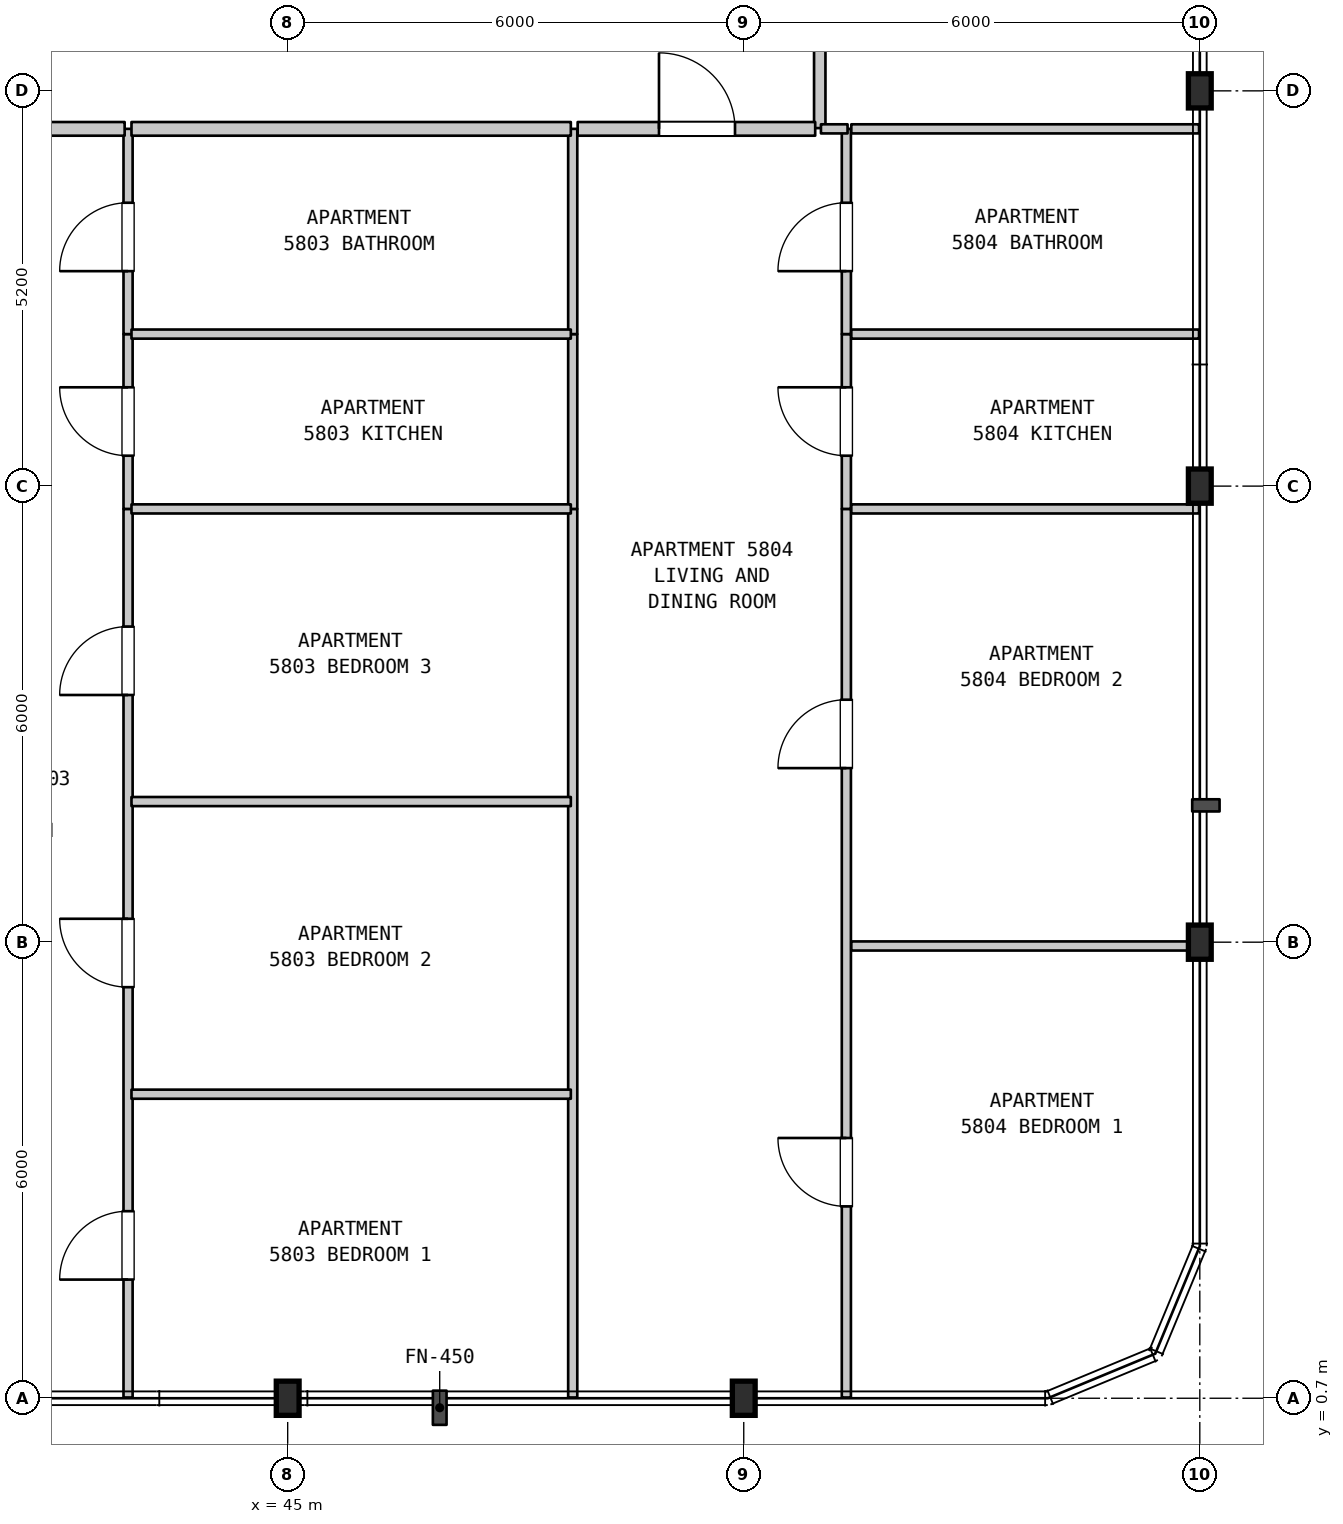
"""IFC4 building model, lengths in metres.
Left out: names, types, materials, properties, quantities, classifications, styles, units other than length and angle.
Written with IfcOpenShell. Run it as: python <this file> out.ifc"""

import sys

from ifc_helpers import new_model, si_unit, direction, frame, frame_2d, origin, origin_2d, place, context, subcontext, project, spatial, rectangle, i_section, extrude, element, fill, save


model = new_model("IFC4")
c1 = context("Model", 3, precision=1e-05, world=origin(), true_north=direction((0.0, 1.0)))
c2 = subcontext(c1, "Body", "Model", "MODEL_VIEW")
j1 = project(units=[si_unit("LENGTHUNIT", "METRE"), si_unit("PLANEANGLEUNIT", "RADIAN")], contexts=[c1])
p1 = place(None, origin())
s1 = spatial("IfcSite", under=j1, at=p1, CompositionType="ELEMENT")
p2 = place(p1, origin())
s2 = spatial("IfcBuilding", under=s1, at=p2, CompositionType="ELEMENT")
p3 = place(p2, frame((0.0, 0.0, 233.9)))
s3 = spatial("IfcBuildingStorey", under=s2, at=p3, CompositionType="ELEMENT", Elevation=233.9)
for number, where, z_axis, x_axis in (
    (1, (45.0, 0.7, 0.0), (0.0, 0.0, 1.0), (1.0, 0.0, 0.0)),
    (2, (51.0, 0.7, 0.0), (0.0, 0.0, 1.0), (1.0, 0.0, 0.0)),
    (3, (57.0, 6.7, 0.0), (0.0, 0.0, 1.0), (1.0, 0.0, 0.0)),
    (4, (57.0, 12.7, 0.0), (0.0, 0.0, 1.0), (1.0, 0.0, 0.0)),
    (5, (57.0, 17.9, 0.0), (0.0, 0.0, 1.0), (1.0, 0.0, 0.0)),
):
    element("IfcColumn", number, at=place(p3, frame(where, z_axis=z_axis, x_axis=x_axis)), inside=s3, PredefinedType="COLUMN", context=c2, shape_type="SweptSolid", body=[
        extrude(i_section(OverallWidth=0.3, OverallDepth=0.45, WebThickness=0.014, FlangeThickness=0.026, FilletRadius=0.027, at=origin_2d()), origin(), (0.0, 0.0, 1.0), 3.7),
    ])
p4 = place(p3, frame((42.9, 0.71, 0.0), z_axis=(0.0, 0.0, 1.0), x_axis=(0.0, 1.0, 0.0)))
e6 = element("IfcWall", 6, at=p4, inside=s3, PredefinedType="PARTITIONING", context=c2, shape_type="SweptSolid", body=[
    extrude(rectangle(XDim=11.69, YDim=0.12, at=frame_2d((5.845, 0.0))), origin(), (0.0, 0.0, 1.0), 3.28),
])
p5 = place(p4, frame((1.551, 0.0, 0.0)))
e7 = element("IfcOpeningElement", 7, at=p5, cuts=e6, PredefinedType="OPENING", context=c2, shape_type="SweptSolid", body=[
    extrude(rectangle(XDim=0.9, YDim=2.15, at=frame_2d((0.45, 1.075))), frame((0.0, 0.07, 0.0), z_axis=(0.0, -1.0, 0.0), x_axis=(1.0, 0.0, 0.0)), (0.0, 0.0, 1.0), 0.14),
])
p6 = place(p4, frame((5.398, 0.0, 0.0)))
e8 = element("IfcOpeningElement", 8, at=p6, cuts=e6, PredefinedType="OPENING", context=c2, shape_type="SweptSolid", body=[
    extrude(rectangle(XDim=0.9, YDim=2.15, at=frame_2d((0.45, 1.075))), frame((0.0, 0.07, 0.0), z_axis=(0.0, -1.0, 0.0), x_axis=(1.0, 0.0, 0.0)), (0.0, 0.0, 1.0), 0.14),
])
p7 = place(p4, frame((9.242, 0.0, 0.0)))
e9 = element("IfcOpeningElement", 9, at=p7, cuts=e6, PredefinedType="OPENING", context=c2, shape_type="SweptSolid", body=[
    extrude(rectangle(XDim=0.9, YDim=2.15, at=frame_2d((0.45, 1.075))), frame((0.0, 0.07, 0.0), z_axis=(0.0, -1.0, 0.0), x_axis=(1.0, 0.0, 0.0)), (0.0, 0.0, 1.0), 0.14),
])
p8 = place(p3, frame((42.9, 12.4, 0.0), z_axis=(0.0, 0.0, 1.0), x_axis=(0.0, 1.0, 0.0)))
e10 = element("IfcWall", 10, at=p8, inside=s3, PredefinedType="PARTITIONING", context=c2, shape_type="SweptSolid", body=[
    extrude(rectangle(XDim=2.3, YDim=0.12, at=frame_2d((1.15, 0.0))), origin(), (0.0, 0.0, 1.0), 3.28),
])
p9 = place(p8, frame((0.7, 0.0, 0.0)))
e11 = element("IfcOpeningElement", 11, at=p9, cuts=e10, PredefinedType="OPENING", context=c2, shape_type="SweptSolid", body=[
    extrude(rectangle(XDim=0.9, YDim=2.15, at=frame_2d((0.45, 1.075))), frame((0.0, 0.07, 0.0), z_axis=(0.0, -1.0, 0.0), x_axis=(1.0, 0.0, 0.0)), (0.0, 0.0, 1.0), 0.14),
])
p10 = place(p3, frame((42.9, 14.7, 0.0), z_axis=(0.0, 0.0, 1.0), x_axis=(0.0, 1.0, 0.0)))
e12 = element("IfcWall", 12, at=p10, inside=s3, PredefinedType="PARTITIONING", context=c2, shape_type="SweptSolid", body=[
    extrude(rectangle(XDim=2.7, YDim=0.12, at=frame_2d((1.35, 0.0))), origin(), (0.0, 0.0, 1.0), 3.28),
])
p11 = place(p10, frame((0.828, 0.0, 0.0)))
e13 = element("IfcOpeningElement", 13, at=p11, cuts=e12, PredefinedType="OPENING", context=c2, shape_type="SweptSolid", body=[
    extrude(rectangle(XDim=0.9, YDim=2.1, at=frame_2d((0.45, 1.05))), frame((0.0, 0.07, 0.0), z_axis=(0.0, -1.0, 0.0), x_axis=(1.0, 0.0, 0.0)), (0.0, 0.0, 1.0), 0.14),
])
p12 = place(p3, frame((48.75, 0.71, 0.0), z_axis=(0.0, 0.0, 1.0), x_axis=(0.0, 1.0, 0.0)))
e14 = element("IfcWall", 14, at=p12, inside=s3, PredefinedType="PARTITIONING", context=c2, shape_type="SweptSolid", body=[
    extrude(rectangle(XDim=11.69, YDim=0.12, at=frame_2d((5.845, 0.0))), origin(), (0.0, 0.0, 1.0), 3.28),
])
p13 = place(p3, frame((48.75, 12.4, 0.0), z_axis=(0.0, 0.0, 1.0), x_axis=(0.0, 1.0, 0.0)))
e15 = element("IfcWall", 15, at=p13, inside=s3, PredefinedType="PARTITIONING", context=c2, shape_type="SweptSolid", body=[
    extrude(rectangle(XDim=2.3, YDim=0.12, at=frame_2d((1.15, 0.0))), origin(), (0.0, 0.0, 1.0), 3.28),
])
p14 = place(p3, frame((48.75, 14.7, 0.0), z_axis=(0.0, 0.0, 1.0), x_axis=(0.0, 1.0, 0.0)))
e16 = element("IfcWall", 16, at=p14, inside=s3, PredefinedType="PARTITIONING", context=c2, shape_type="SweptSolid", body=[
    extrude(rectangle(XDim=2.7, YDim=0.12, at=frame_2d((1.35, 0.0))), origin(), (0.0, 0.0, 1.0), 3.28),
])
p15 = place(p3, frame((52.0, 17.41, 0.0), z_axis=(0.0, 0.0, 1.0), x_axis=(0.0, 1.0, 0.0)))
e17 = element("IfcWall", 17, at=p15, inside=s3, PredefinedType="STANDARD", context=c2, shape_type="SweptSolid", body=[
    extrude(rectangle(XDim=2.09, YDim=0.15, at=frame_2d((1.045, 0.0))), origin(), (0.0, 0.0, 1.0), 3.28),
])
p16 = place(p3, frame((52.35, 0.71, 0.0), z_axis=(0.0, 0.0, 1.0), x_axis=(0.0, 1.0, 0.0)))
e18 = element("IfcWall", 18, at=p16, inside=s3, PredefinedType="PARTITIONING", context=c2, shape_type="SweptSolid", body=[
    extrude(rectangle(XDim=11.69, YDim=0.12, at=frame_2d((5.845, 0.0))), origin(), (0.0, 0.0, 1.0), 3.28),
])
p17 = place(p16, frame((2.514, 0.0, 0.0)))
e19 = element("IfcOpeningElement", 19, at=p17, cuts=e18, PredefinedType="OPENING", context=c2, shape_type="SweptSolid", body=[
    extrude(rectangle(XDim=0.9, YDim=2.15, at=frame_2d((0.45, 1.075))), frame((0.0, 0.07, 0.0), z_axis=(0.0, -1.0, 0.0), x_axis=(1.0, 0.0, 0.0)), (0.0, 0.0, 1.0), 0.14),
])
p18 = place(p16, frame((8.28, 0.0, 0.0)))
e20 = element("IfcOpeningElement", 20, at=p18, cuts=e18, PredefinedType="OPENING", context=c2, shape_type="SweptSolid", body=[
    extrude(rectangle(XDim=0.9, YDim=2.15, at=frame_2d((0.45, 1.075))), frame((0.0, 0.07, 0.0), z_axis=(0.0, -1.0, 0.0), x_axis=(1.0, 0.0, 0.0)), (0.0, 0.0, 1.0), 0.14),
])
p19 = place(p3, frame((52.35, 12.4, 0.0), z_axis=(0.0, 0.0, 1.0), x_axis=(0.0, 1.0, 0.0)))
e21 = element("IfcWall", 21, at=p19, inside=s3, PredefinedType="PARTITIONING", context=c2, shape_type="SweptSolid", body=[
    extrude(rectangle(XDim=2.3, YDim=0.12, at=frame_2d((1.15, 0.0))), origin(), (0.0, 0.0, 1.0), 3.28),
])
p20 = place(p19, frame((0.7, 0.0, 0.0)))
e22 = element("IfcOpeningElement", 22, at=p20, cuts=e21, PredefinedType="OPENING", context=c2, shape_type="SweptSolid", body=[
    extrude(rectangle(XDim=0.9, YDim=2.15, at=frame_2d((0.45, 1.075))), frame((0.0, 0.07, 0.0), z_axis=(0.0, -1.0, 0.0), x_axis=(1.0, 0.0, 0.0)), (0.0, 0.0, 1.0), 0.14),
])
p21 = place(p3, frame((52.35, 14.7, 0.0), z_axis=(0.0, 0.0, 1.0), x_axis=(0.0, 1.0, 0.0)))
e23 = element("IfcWall", 23, at=p21, inside=s3, PredefinedType="PARTITIONING", context=c2, shape_type="SweptSolid", body=[
    extrude(rectangle(XDim=2.7, YDim=0.12, at=frame_2d((1.35, 0.0))), origin(), (0.0, 0.0, 1.0), 3.28),
])
p22 = place(p21, frame((0.828, 0.0, 0.0)))
e24 = element("IfcOpeningElement", 24, at=p22, cuts=e23, PredefinedType="OPENING", context=c2, shape_type="SweptSolid", body=[
    extrude(rectangle(XDim=0.9, YDim=2.1, at=frame_2d((0.45, 1.05))), frame((0.0, 0.07, 0.0), z_axis=(0.0, -1.0, 0.0), x_axis=(1.0, 0.0, 0.0)), (0.0, 0.0, 1.0), 0.14),
])
p23 = place(p3, frame((42.945, 4.7, 0.0), z_axis=(0.0, 0.0, 1.0), x_axis=(1.0, 0.0, 0.0)))
e25 = element("IfcWall", 25, at=p23, inside=s3, PredefinedType="PARTITIONING", context=c2, shape_type="SweptSolid", body=[
    extrude(rectangle(XDim=5.78, YDim=0.12, at=frame_2d((2.89, 0.0))), origin(), (0.0, 0.0, 1.0), 3.28),
])
p24 = place(p3, frame((52.415, 6.65, 0.0), z_axis=(0.0, 0.0, 1.0), x_axis=(1.0, 0.0, 0.0)))
e26 = element("IfcWall", 26, at=p24, inside=s3, PredefinedType="PARTITIONING", context=c2, shape_type="SweptSolid", body=[
    extrude(rectangle(XDim=4.575, YDim=0.12, at=frame_2d((2.288, 0.0))), origin(), (0.0, 0.0, 1.0), 2.68),
])
for number, where, z_axis, x_axis in (
    (27, (42.945, 8.55, 0.0), (0.0, 0.0, 1.0), (1.0, 0.0, 0.0)),
    (28, (42.945, 12.4, 0.0), (0.0, 0.0, 1.0), (1.0, 0.0, 0.0)),
):
    element("IfcWall", number, at=place(p3, frame(where, z_axis=z_axis, x_axis=x_axis)), inside=s3, PredefinedType="PARTITIONING", context=c2, shape_type="SweptSolid", body=[
        extrude(rectangle(XDim=5.78, YDim=0.12, at=frame_2d((2.89, 0.0))), origin(), (0.0, 0.0, 1.0), 3.28),
    ])
p25 = place(p3, frame((52.415, 12.4, 0.0), z_axis=(0.0, 0.0, 1.0), x_axis=(1.0, 0.0, 0.0)))
e29 = element("IfcWall", 29, at=p25, inside=s3, PredefinedType="PARTITIONING", context=c2, shape_type="SweptSolid", body=[
    extrude(rectangle(XDim=4.575, YDim=0.12, at=frame_2d((2.288, 0.0))), origin(), (0.0, 0.0, 1.0), 3.28),
])
p26 = place(p3, frame((42.945, 14.7, 0.0), z_axis=(0.0, 0.0, 1.0), x_axis=(1.0, 0.0, 0.0)))
e30 = element("IfcWall", 30, at=p26, inside=s3, PredefinedType="PARTITIONING", context=c2, shape_type="SweptSolid", body=[
    extrude(rectangle(XDim=5.78, YDim=0.12, at=frame_2d((2.89, 0.0))), origin(), (0.0, 0.0, 1.0), 3.28),
])
p27 = place(p3, frame((52.415, 14.7, 0.0), z_axis=(0.0, 0.0, 1.0), x_axis=(1.0, 0.0, 0.0)))
e31 = element("IfcWall", 31, at=p27, inside=s3, PredefinedType="PARTITIONING", context=c2, shape_type="SweptSolid", body=[
    extrude(rectangle(XDim=4.575, YDim=0.12, at=frame_2d((2.288, 0.0))), origin(), (0.0, 0.0, 1.0), 3.28),
])
p28 = place(p3, frame((38.895, 17.4, 0.0), z_axis=(0.0, 0.0, 1.0), x_axis=(1.0, 0.0, 0.0)))
e32 = element("IfcWall", 32, at=p28, inside=s3, PredefinedType="STANDARD", context=c2, shape_type="SweptSolid", body=[
    extrude(rectangle(XDim=3.96, YDim=0.18, at=frame_2d((1.98, 0.0))), origin(), (0.0, 0.0, 1.0), 3.28),
])
p29 = place(p28, frame((1.609, 0.0, 0.0)))
e33 = element("IfcOpeningElement", 33, at=p29, cuts=e32, PredefinedType="OPENING", context=c2, shape_type="SweptSolid", body=[
    extrude(rectangle(XDim=1.0, YDim=2.15, at=frame_2d((0.5, 1.075))), frame((0.0, 0.1, 0.0), z_axis=(0.0, -1.0, 0.0), x_axis=(1.0, 0.0, 0.0)), (0.0, 0.0, 1.0), 0.2),
])
p30 = place(p3, frame((42.945, 17.4, 0.0), z_axis=(0.0, 0.0, 1.0), x_axis=(1.0, 0.0, 0.0)))
e34 = element("IfcWall", 34, at=p30, inside=s3, PredefinedType="STANDARD", context=c2, shape_type="SweptSolid", body=[
    extrude(rectangle(XDim=5.78, YDim=0.18, at=frame_2d((2.89, 0.0))), origin(), (0.0, 0.0, 1.0), 3.28),
])
p31 = place(p3, frame((48.815, 17.4, 0.0), z_axis=(0.0, 0.0, 1.0), x_axis=(1.0, 0.0, 0.0)))
e35 = element("IfcWall", 35, at=p31, inside=s3, PredefinedType="STANDARD", context=c2, shape_type="SweptSolid", body=[
    extrude(rectangle(XDim=3.125, YDim=0.18, at=frame_2d((1.562, 0.0))), origin(), (0.0, 0.0, 1.0), 3.28),
])
p32 = place(p31, frame((1.07, 0.0, 0.0)))
e36 = element("IfcOpeningElement", 36, at=p32, cuts=e35, PredefinedType="OPENING", context=c2, shape_type="SweptSolid", body=[
    extrude(rectangle(XDim=1.0, YDim=2.15, at=frame_2d((0.5, 1.075))), frame((0.0, 0.1, 0.0), z_axis=(0.0, -1.0, 0.0), x_axis=(1.0, 0.0, 0.0)), (0.0, 0.0, 1.0), 0.2),
])
p33 = place(p3, frame((52.016, 17.4, 0.0), z_axis=(0.0, 0.0, 1.0), x_axis=(1.0, 0.0, 0.0)))
e37 = element("IfcWall", 37, at=p33, inside=s3, PredefinedType="PARTITIONING", context=c2, shape_type="SweptSolid", body=[
    extrude(rectangle(XDim=0.35, YDim=0.12, at=frame_2d((0.175, 0.0))), origin(), (0.0, 0.0, 1.0), 3.28),
])
p34 = place(p3, frame((52.415, 17.4, 0.0), z_axis=(0.0, 0.0, 1.0), x_axis=(1.0, 0.0, 0.0)))
e38 = element("IfcWall", 38, at=p34, inside=s3, PredefinedType="PARTITIONING", context=c2, shape_type="SweptSolid", body=[
    extrude(rectangle(XDim=4.575, YDim=0.12, at=frame_2d((2.288, 0.0))), origin(), (0.0, 0.0, 1.0), 3.28),
])
p35 = place(p5, origin())
e39 = element("IfcDoor", 39, at=p35, inside=s3, OperationType="SINGLE_SWING_LEFT", PredefinedType="DOOR", context=c2, shape_type="SweptSolid", body=[
    extrude(rectangle(XDim=0.9, YDim=2.15, at=frame_2d((0.45, 1.075))), frame((0.0, 0.025, 0.0), z_axis=(0.0, -1.0, 0.0), x_axis=(1.0, 0.0, 0.0)), (0.0, 0.0, 1.0), 0.05),
])
fill(e7, e39)
p36 = place(p6, origin())
e40 = element("IfcDoor", 40, at=p36, inside=s3, OperationType="SINGLE_SWING_RIGHT", PredefinedType="DOOR", context=c2, shape_type="SweptSolid", body=[
    extrude(rectangle(XDim=0.9, YDim=2.15, at=frame_2d((0.45, 1.075))), frame((0.0, 0.025, 0.0), z_axis=(0.0, -1.0, 0.0), x_axis=(1.0, 0.0, 0.0)), (0.0, 0.0, 1.0), 0.05),
])
fill(e8, e40)
p37 = place(p7, origin())
e41 = element("IfcDoor", 41, at=p37, inside=s3, OperationType="SINGLE_SWING_LEFT", PredefinedType="DOOR", context=c2, shape_type="SweptSolid", body=[
    extrude(rectangle(XDim=0.9, YDim=2.15, at=frame_2d((0.45, 1.075))), frame((0.0, 0.025, 0.0), z_axis=(0.0, -1.0, 0.0), x_axis=(1.0, 0.0, 0.0)), (0.0, 0.0, 1.0), 0.05),
])
fill(e9, e41)
p38 = place(p9, origin())
e42 = element("IfcDoor", 42, at=p38, inside=s3, OperationType="SINGLE_SWING_RIGHT", PredefinedType="DOOR", context=c2, shape_type="SweptSolid", body=[
    extrude(rectangle(XDim=0.9, YDim=2.15, at=frame_2d((0.45, 1.075))), frame((0.0, 0.025, 0.0), z_axis=(0.0, -1.0, 0.0), x_axis=(1.0, 0.0, 0.0)), (0.0, 0.0, 1.0), 0.05),
])
fill(e11, e42)
p39 = place(p11, origin())
e43 = element("IfcDoor", 43, at=p39, inside=s3, OperationType="SINGLE_SWING_LEFT", PredefinedType="DOOR", context=c2, shape_type="SweptSolid", body=[
    extrude(rectangle(XDim=0.9, YDim=2.1, at=frame_2d((0.45, 1.05))), frame((0.0, 0.025, 0.0), z_axis=(0.0, -1.0, 0.0), x_axis=(1.0, 0.0, 0.0)), (0.0, 0.0, 1.0), 0.05),
])
fill(e13, e43)
p40 = place(p17, origin())
e44 = element("IfcDoor", 44, at=p40, inside=s3, OperationType="SINGLE_SWING_RIGHT", PredefinedType="DOOR", context=c2, shape_type="SweptSolid", body=[
    extrude(rectangle(XDim=0.9, YDim=2.15, at=frame_2d((0.45, 1.075))), frame((0.0, 0.025, 0.0), z_axis=(0.0, -1.0, 0.0), x_axis=(1.0, 0.0, 0.0)), (0.0, 0.0, 1.0), 0.05),
])
fill(e19, e44)
p41 = place(p18, origin())
e45 = element("IfcDoor", 45, at=p41, inside=s3, OperationType="SINGLE_SWING_LEFT", PredefinedType="DOOR", context=c2, shape_type="SweptSolid", body=[
    extrude(rectangle(XDim=0.9, YDim=2.15, at=frame_2d((0.45, 1.075))), frame((0.0, 0.025, 0.0), z_axis=(0.0, -1.0, 0.0), x_axis=(1.0, 0.0, 0.0)), (0.0, 0.0, 1.0), 0.05),
])
fill(e20, e45)
p42 = place(p20, origin())
e46 = element("IfcDoor", 46, at=p42, inside=s3, OperationType="SINGLE_SWING_RIGHT", PredefinedType="DOOR", context=c2, shape_type="SweptSolid", body=[
    extrude(rectangle(XDim=0.9, YDim=2.15, at=frame_2d((0.45, 1.075))), frame((0.0, 0.025, 0.0), z_axis=(0.0, -1.0, 0.0), x_axis=(1.0, 0.0, 0.0)), (0.0, 0.0, 1.0), 0.05),
])
fill(e22, e46)
p43 = place(p22, origin())
e47 = element("IfcDoor", 47, at=p43, inside=s3, OperationType="SINGLE_SWING_LEFT", PredefinedType="DOOR", context=c2, shape_type="SweptSolid", body=[
    extrude(rectangle(XDim=0.9, YDim=2.1, at=frame_2d((0.45, 1.05))), frame((0.0, 0.025, 0.0), z_axis=(0.0, -1.0, 0.0), x_axis=(1.0, 0.0, 0.0)), (0.0, 0.0, 1.0), 0.05),
])
fill(e24, e47)
p44 = place(p32, origin())
e48 = element("IfcDoor", 48, at=p44, inside=s3, OperationType="SINGLE_SWING_LEFT", PredefinedType="DOOR", context=c2, shape_type="SweptSolid", body=[
    extrude(rectangle(XDim=1.0, YDim=2.15, at=frame_2d((0.5, 1.075))), frame((0.0, 0.025, 0.0), z_axis=(0.0, -1.0, 0.0), x_axis=(1.0, 0.0, 0.0)), (0.0, 0.0, 1.0), 0.05),
])
fill(e36, e48)
save(model, sys.argv[1])
